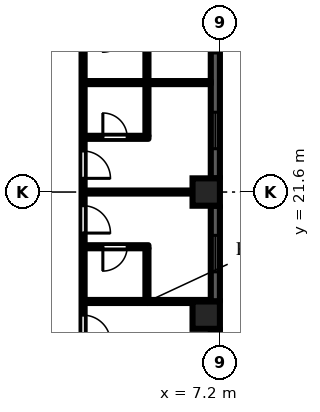
"""IFC4 building model, lengths in metres.
Left out: names, types, materials, properties, quantities, classifications, styles, units other than length and angle.
Written with IfcOpenShell. Run it as: python <this file> out.ifc"""

import sys

from ifc_helpers import new_model, si_unit, direction, frame, frame_2d, origin, origin_2d, place, context, subcontext, project, spatial, rectangle, extrude, element, fill, save


model = new_model("IFC4")
c1 = context("Model", 3, precision=1e-05, world=origin(), true_north=direction((0.0, 1.0)))
c2 = subcontext(c1, "Body", "Model", "MODEL_VIEW")
j1 = project(units=[si_unit("LENGTHUNIT", "METRE"), si_unit("PLANEANGLEUNIT", "RADIAN")], contexts=[c1])
p1 = place(None, origin())
s1 = spatial("IfcSite", under=j1, at=p1, CompositionType="ELEMENT")
p2 = place(p1, origin())
s2 = spatial("IfcBuilding", under=s1, at=p2, CompositionType="ELEMENT")
p3 = place(p2, frame((0.0, 0.0, 35.7)))
s3 = spatial("IfcBuildingStorey", under=s2, at=p3, CompositionType="ELEMENT", Elevation=35.7)
for number, where, z_axis, x_axis in (
    (1, (6.75, 17.55, 0.0), (0.0, 0.0, 1.0), (1.0, 0.0, 0.0)),
    (2, (6.75, 21.6, 0.0), (0.0, 0.0, 1.0), (1.0, 0.0, 0.0)),
):
    element("IfcColumn", number, at=place(p3, frame(where, z_axis=z_axis, x_axis=x_axis)), inside=s3, PredefinedType="COLUMN", context=c2, shape_type="SweptSolid", body=[
        extrude(rectangle(XDim=0.9, YDim=0.9, at=origin_2d()), origin(), (0.0, 0.0, 1.0), 3.0),
    ])
p4 = place(p3, frame((7.05, 15.3, 0.0), z_axis=(0.0, 0.0, 1.0), x_axis=(0.0, 1.0, 0.0)))
e3 = element("IfcWall", 3, at=p4, inside=s3, PredefinedType="SOLIDWALL", context=c2, shape_type="SweptSolid", body=[
    extrude(rectangle(XDim=1.8, YDim=0.3, at=frame_2d((0.9, 0.0))), origin(), (0.0, 0.0, 1.0), 2.1),
])
p5 = place(p4, frame((0.3, 0.0, 0.2)))
e4 = element("IfcOpeningElement", 4, at=p5, cuts=e3, PredefinedType="OPENING", context=c2, shape_type="SweptSolid", body=[
    extrude(rectangle(XDim=1.2, YDim=1.85, at=frame_2d((0.6, 0.925))), frame((0.0, 0.16, 0.0), z_axis=(0.0, -1.0, 0.0), x_axis=(1.0, 0.0, 0.0)), (0.0, 0.0, 1.0), 0.32),
])
p6 = place(p3, frame((7.05, 18.0, 0.0), z_axis=(0.0, 0.0, 1.0), x_axis=(0.0, 1.0, 0.0)))
e5 = element("IfcWall", 5, at=p6, inside=s3, PredefinedType="SOLIDWALL", context=c2, shape_type="SweptSolid", body=[
    extrude(rectangle(XDim=3.15, YDim=0.3, at=frame_2d((1.575, 0.0))), origin(), (0.0, 0.0, 1.0), 2.1),
])
p7 = place(p6, frame((0.975, 0.0, 0.2)))
e6 = element("IfcOpeningElement", 6, at=p7, cuts=e5, PredefinedType="OPENING", context=c2, shape_type="SweptSolid", body=[
    extrude(rectangle(XDim=1.2, YDim=1.85, at=frame_2d((0.6, 0.925))), frame((0.0, 0.16, 0.0), z_axis=(0.0, -1.0, 0.0), x_axis=(1.0, 0.0, 0.0)), (0.0, 0.0, 1.0), 0.32),
])
p8 = place(p3, frame((7.05, 22.05, 0.0), z_axis=(0.0, 0.0, 1.0), x_axis=(0.0, 1.0, 0.0)))
e7 = element("IfcWall", 7, at=p8, inside=s3, PredefinedType="SOLIDWALL", context=c2, shape_type="SweptSolid", body=[
    extrude(rectangle(XDim=6.3, YDim=0.3, at=frame_2d((3.15, 0.0))), origin(), (0.0, 0.0, 1.0), 2.1),
])
p9 = place(p8, frame((0.975, 0.0, 0.2)))
e8 = element("IfcOpeningElement", 8, at=p9, cuts=e7, PredefinedType="OPENING", context=c2, shape_type="SweptSolid", body=[
    extrude(rectangle(XDim=1.2, YDim=1.85, at=frame_2d((0.6, 0.925))), frame((0.0, 0.16, 0.0), z_axis=(0.0, -1.0, 0.0), x_axis=(1.0, 0.0, 0.0)), (0.0, 0.0, 1.0), 0.32),
])
p10 = place(p8, frame((4.125, 0.0, 0.2)))
e9 = element("IfcOpeningElement", 9, at=p10, cuts=e7, PredefinedType="OPENING", context=c2, shape_type="SweptSolid", body=[
    extrude(rectangle(XDim=1.2, YDim=1.85, at=frame_2d((0.6, 0.925))), frame((0.0, 0.16, 0.0), z_axis=(0.0, -1.0, 0.0), x_axis=(1.0, 0.0, 0.0)), (0.0, 0.0, 1.0), 0.32),
])
p11 = place(p3, frame((2.7, 14.462, 0.0), z_axis=(0.0, 0.0, 1.0), x_axis=(0.0, 1.0, 0.0)))
e10 = element("IfcWall", 10, at=p11, inside=s3, PredefinedType="PARTITIONING", context=c2, shape_type="SweptSolid", body=[
    extrude(rectangle(XDim=17.888, YDim=0.1, at=frame_2d((8.944, 0.0))), origin(), (0.0, 0.0, 1.0), 2.575),
])
p12 = place(p11, frame((2.188, 0.0, 0.0)))
e11 = element("IfcOpeningElement", 11, at=p12, cuts=e10, PredefinedType="OPENING", context=c2, shape_type="SweptSolid", body=[
    extrude(rectangle(XDim=0.9, YDim=2.1, at=frame_2d((0.45, 1.05))), frame((0.0, 0.06, 0.0), z_axis=(0.0, -1.0, 0.0), x_axis=(1.0, 0.0, 0.0)), (0.0, 0.0, 1.0), 0.12),
])
p13 = place(p11, frame((5.788, 0.0, 0.0)))
e12 = element("IfcOpeningElement", 12, at=p13, cuts=e10, PredefinedType="OPENING", context=c2, shape_type="SweptSolid", body=[
    extrude(rectangle(XDim=0.9, YDim=2.1, at=frame_2d((0.45, 1.05))), frame((0.0, 0.06, 0.0), z_axis=(0.0, -1.0, 0.0), x_axis=(1.0, 0.0, 0.0)), (0.0, 0.0, 1.0), 0.12),
])
p14 = place(p11, frame((7.587, 0.0, 0.0)))
e13 = element("IfcOpeningElement", 13, at=p14, cuts=e10, PredefinedType="OPENING", context=c2, shape_type="SweptSolid", body=[
    extrude(rectangle(XDim=0.9, YDim=2.1, at=frame_2d((0.45, 1.05))), frame((0.0, 0.06, 0.0), z_axis=(0.0, -1.0, 0.0), x_axis=(1.0, 0.0, 0.0)), (0.0, 0.0, 1.0), 0.12),
])
p15 = place(p11, frame((12.988, 0.0, 0.0)))
e14 = element("IfcOpeningElement", 14, at=p15, cuts=e10, PredefinedType="OPENING", context=c2, shape_type="SweptSolid", body=[
    extrude(rectangle(XDim=0.9, YDim=2.1, at=frame_2d((0.45, 1.05))), frame((0.0, 0.06, 0.0), z_axis=(0.0, -1.0, 0.0), x_axis=(1.0, 0.0, 0.0)), (0.0, 0.0, 1.0), 0.12),
])
p16 = place(p11, frame((14.788, 0.0, 0.0)))
e15 = element("IfcOpeningElement", 15, at=p16, cuts=e10, PredefinedType="OPENING", context=c2, shape_type="SweptSolid", body=[
    extrude(rectangle(XDim=0.9, YDim=2.1, at=frame_2d((0.45, 1.05))), frame((0.0, 0.06, 0.0), z_axis=(0.0, -1.0, 0.0), x_axis=(1.0, 0.0, 0.0)), (0.0, 0.0, 1.0), 0.12),
])
p17 = place(p3, frame((2.75, 18.0, 0.0), z_axis=(0.0, 0.0, 1.0), x_axis=(1.0, 0.0, 0.0)))
e16 = element("IfcWall", 16, at=p17, inside=s3, PredefinedType="PARTITIONING", context=c2, shape_type="SweptSolid", body=[
    extrude(rectangle(XDim=4.15, YDim=0.1, at=frame_2d((2.075, 0.0))), origin(), (0.0, 0.0, 1.0), 2.575),
])
p18 = place(p3, frame((2.75, 19.8, 0.0), z_axis=(0.0, 0.0, 1.0), x_axis=(1.0, 0.0, 0.0)))
e17 = element("IfcWall", 17, at=p18, inside=s3, PredefinedType="PARTITIONING", context=c2, shape_type="SweptSolid", body=[
    extrude(rectangle(XDim=2.1, YDim=0.1, at=frame_2d((1.05, 0.0))), origin(), (0.0, 0.0, 1.0), 2.575),
])
p19 = place(p18, frame((0.6, 0.0, 0.0)))
e18 = element("IfcOpeningElement", 18, at=p19, cuts=e17, PredefinedType="OPENING", context=c2, shape_type="SweptSolid", body=[
    extrude(rectangle(XDim=0.8, YDim=2.1, at=frame_2d((0.4, 1.05))), frame((0.0, 0.06, 0.0), z_axis=(0.0, -1.0, 0.0), x_axis=(1.0, 0.0, 0.0)), (0.0, 0.0, 1.0), 0.12),
])
p20 = place(p3, frame((2.75, 21.6, 0.0), z_axis=(0.0, 0.0, 1.0), x_axis=(1.0, 0.0, 0.0)))
e19 = element("IfcWall", 19, at=p20, inside=s3, PredefinedType="PARTITIONING", context=c2, shape_type="SweptSolid", body=[
    extrude(rectangle(XDim=4.15, YDim=0.1, at=frame_2d((2.075, 0.0))), origin(), (0.0, 0.0, 1.0), 2.575),
])
p21 = place(p3, frame((2.75, 23.4, 0.0), z_axis=(0.0, 0.0, 1.0), x_axis=(1.0, 0.0, 0.0)))
e20 = element("IfcWall", 20, at=p21, inside=s3, PredefinedType="PARTITIONING", context=c2, shape_type="SweptSolid", body=[
    extrude(rectangle(XDim=2.1, YDim=0.1, at=frame_2d((1.05, 0.0))), origin(), (0.0, 0.0, 1.0), 2.575),
])
p22 = place(p21, frame((0.6, 0.0, 0.0)))
e21 = element("IfcOpeningElement", 21, at=p22, cuts=e20, PredefinedType="OPENING", context=c2, shape_type="SweptSolid", body=[
    extrude(rectangle(XDim=0.8, YDim=2.1, at=frame_2d((0.4, 1.05))), frame((0.0, 0.06, 0.0), z_axis=(0.0, -1.0, 0.0), x_axis=(1.0, 0.0, 0.0)), (0.0, 0.0, 1.0), 0.12),
])
p23 = place(p3, frame((2.75, 25.2, 0.0), z_axis=(0.0, 0.0, 1.0), x_axis=(1.0, 0.0, 0.0)))
e22 = element("IfcWall", 22, at=p23, inside=s3, PredefinedType="PARTITIONING", context=c2, shape_type="SweptSolid", body=[
    extrude(rectangle(XDim=4.15, YDim=0.1, at=frame_2d((2.075, 0.0))), origin(), (0.0, 0.0, 1.0), 2.575),
])
p24 = place(p3, frame((4.8, 18.05, 0.0), z_axis=(0.0, 0.0, 1.0), x_axis=(0.0, 1.0, 0.0)))
e23 = element("IfcWall", 23, at=p24, inside=s3, PredefinedType="PARTITIONING", context=c2, shape_type="SweptSolid", body=[
    extrude(rectangle(XDim=1.7, YDim=0.1, at=frame_2d((0.85, 0.0))), origin(), (0.0, 0.0, 1.0), 2.575),
])
p25 = place(p3, frame((4.8, 23.45, 0.0), z_axis=(0.0, 0.0, 1.0), x_axis=(0.0, 1.0, 0.0)))
e24 = element("IfcWall", 24, at=p25, inside=s3, PredefinedType="PARTITIONING", context=c2, shape_type="SweptSolid", body=[
    extrude(rectangle(XDim=3.5, YDim=0.1, at=frame_2d((1.75, 0.0))), origin(), (0.0, 0.0, 1.0), 2.575),
])
p26 = place(p7, origin())
e25 = element("IfcWindow", 25, at=p26, inside=s3, PartitioningType="SINGLE_PANEL", PredefinedType="WINDOW", context=c2, shape_type="SweptSolid", body=[
    extrude(rectangle(XDim=1.2, YDim=1.85, at=frame_2d((0.6, 0.925))), frame((0.0, 0.03, 0.0), z_axis=(0.0, -1.0, 0.0), x_axis=(1.0, 0.0, 0.0)), (0.0, 0.0, 1.0), 0.06),
])
fill(e6, e25)
p27 = place(p9, origin())
e26 = element("IfcWindow", 26, at=p27, inside=s3, PartitioningType="SINGLE_PANEL", PredefinedType="WINDOW", context=c2, shape_type="SweptSolid", body=[
    extrude(rectangle(XDim=1.2, YDim=1.85, at=frame_2d((0.6, 0.925))), frame((0.0, 0.03, 0.0), z_axis=(0.0, -1.0, 0.0), x_axis=(1.0, 0.0, 0.0)), (0.0, 0.0, 1.0), 0.06),
])
fill(e8, e26)
p28 = place(p10, origin())
e27 = element("IfcWindow", 27, at=p28, inside=s3, PartitioningType="SINGLE_PANEL", PredefinedType="WINDOW", context=c2, shape_type="SweptSolid", body=[
    extrude(rectangle(XDim=1.2, YDim=1.85, at=frame_2d((0.6, 0.925))), frame((0.0, 0.03, 0.0), z_axis=(0.0, -1.0, 0.0), x_axis=(1.0, 0.0, 0.0)), (0.0, 0.0, 1.0), 0.06),
])
fill(e9, e27)
p29 = place(p12, frame((0.9, 0.0, 0.0), z_axis=(0.0, 0.0, 1.0), x_axis=(-1.0, 0.0, 0.0)))
e28 = element("IfcDoor", 28, at=p29, inside=s3, OperationType="SINGLE_SWING_RIGHT", PredefinedType="DOOR", context=c2, shape_type="SweptSolid", body=[
    extrude(rectangle(XDim=0.9, YDim=2.1, at=frame_2d((0.45, 1.05))), frame((0.0, 0.025, 0.0), z_axis=(0.0, -1.0, 0.0), x_axis=(1.0, 0.0, 0.0)), (0.0, 0.0, 1.0), 0.05),
])
fill(e11, e28)
p30 = place(p13, frame((0.9, 0.0, 0.0), z_axis=(0.0, 0.0, 1.0), x_axis=(-1.0, 0.0, 0.0)))
e29 = element("IfcDoor", 29, at=p30, inside=s3, OperationType="SINGLE_SWING_RIGHT", PredefinedType="DOOR", context=c2, shape_type="SweptSolid", body=[
    extrude(rectangle(XDim=0.9, YDim=2.1, at=frame_2d((0.45, 1.05))), frame((0.0, 0.025, 0.0), z_axis=(0.0, -1.0, 0.0), x_axis=(1.0, 0.0, 0.0)), (0.0, 0.0, 1.0), 0.05),
])
fill(e12, e29)
p31 = place(p14, frame((0.9, 0.0, 0.0), z_axis=(0.0, 0.0, 1.0), x_axis=(-1.0, 0.0, 0.0)))
e30 = element("IfcDoor", 30, at=p31, inside=s3, OperationType="SINGLE_SWING_RIGHT", PredefinedType="DOOR", context=c2, shape_type="SweptSolid", body=[
    extrude(rectangle(XDim=0.9, YDim=2.1, at=frame_2d((0.45, 1.05))), frame((0.0, 0.025, 0.0), z_axis=(0.0, -1.0, 0.0), x_axis=(1.0, 0.0, 0.0)), (0.0, 0.0, 1.0), 0.05),
])
fill(e13, e30)
p32 = place(p19, frame((0.8, 0.0, 0.0), z_axis=(0.0, 0.0, 1.0), x_axis=(-1.0, 0.0, 0.0)))
e31 = element("IfcDoor", 31, at=p32, inside=s3, OperationType="SINGLE_SWING_RIGHT", PredefinedType="DOOR", context=c2, shape_type="SweptSolid", body=[
    extrude(rectangle(XDim=0.8, YDim=2.1, at=frame_2d((0.4, 1.05))), frame((0.0, 0.025, 0.0), z_axis=(0.0, -1.0, 0.0), x_axis=(1.0, 0.0, 0.0)), (0.0, 0.0, 1.0), 0.05),
])
fill(e18, e31)
p33 = place(p22, origin())
e32 = element("IfcDoor", 32, at=p33, inside=s3, OperationType="SINGLE_SWING_LEFT", PredefinedType="DOOR", context=c2, shape_type="SweptSolid", body=[
    extrude(rectangle(XDim=0.8, YDim=2.1, at=frame_2d((0.4, 1.05))), frame((0.0, 0.025, 0.0), z_axis=(0.0, -1.0, 0.0), x_axis=(1.0, 0.0, 0.0)), (0.0, 0.0, 1.0), 0.05),
])
fill(e21, e32)
save(model, sys.argv[1])
